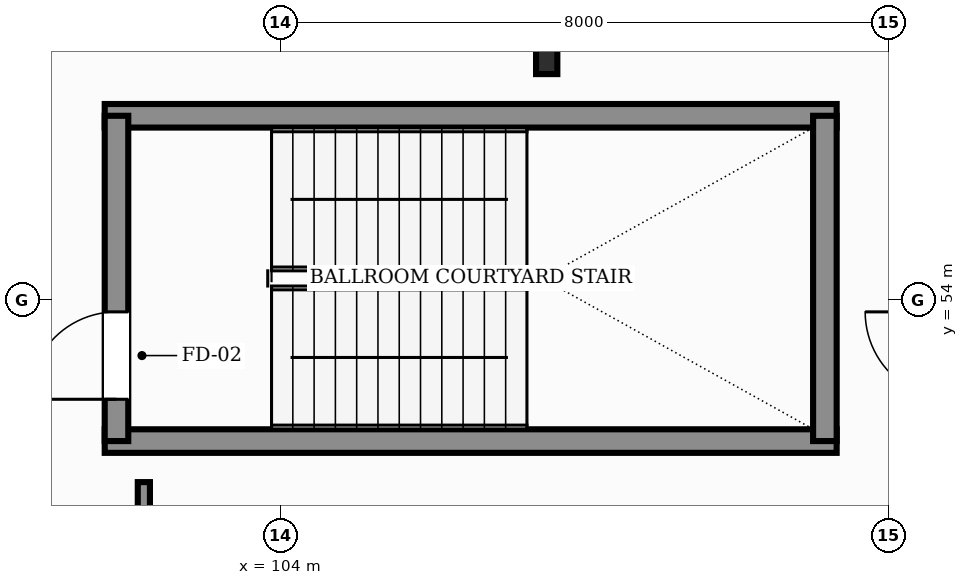
"""IFC4 building model, lengths in metres.
Left out: names, types, materials, properties, quantities, classifications, styles, units other than length and angle.
Written with IfcOpenShell. Run it as: python <this file> out.ifc"""

import sys

from ifc_helpers import new_model, si_unit, direction, frame, frame_2d, origin, origin_2d, place, context, subcontext, project, spatial, rectangle, i_section, extrude, element, fill, save


model = new_model("IFC4")
c1 = context("Model", 3, precision=1e-05, world=origin(), true_north=direction((0.0, 1.0)))
c2 = subcontext(c1, "Body", "Model", "MODEL_VIEW")
j1 = project(units=[si_unit("LENGTHUNIT", "METRE"), si_unit("PLANEANGLEUNIT", "RADIAN")], contexts=[c1])
p1 = place(None, origin())
s1 = spatial("IfcSite", under=j1, at=p1, CompositionType="ELEMENT")
p2 = place(p1, origin())
s2 = spatial("IfcBuilding", under=s1, at=p2, CompositionType="ELEMENT")
p3 = place(p2, frame((0.0, 0.0, 11.4)))
s3 = spatial("IfcBuildingStorey", under=s2, at=p3, CompositionType="ELEMENT", Elevation=11.4)
p4 = place(p3, frame((107.5, 57.2, 0.0), z_axis=(0.0, 0.0, 1.0), x_axis=(1.0, 0.0, 0.0)))
e1 = element("IfcColumn", 1, at=p4, inside=s3, PredefinedType="COLUMN", context=c2, shape_type="SweptSolid", body=[
    extrude(i_section(OverallWidth=0.28, OverallDepth=0.463, WebThickness=0.011, FlangeThickness=0.017, FilletRadius=0.012, at=origin_2d()), origin(), (0.0, 0.0, 1.0), 4.8),
])
for number, where, z_axis, x_axis in (
    (2, (101.685, 52.14, 0.0), (0.0, 0.0, 1.0), (1.0, 0.0, 0.0)),
    (3, (101.685, 56.42, 0.0), (0.0, 0.0, 1.0), (1.0, 0.0, 0.0)),
):
    element("IfcWall", number, at=place(p3, frame(where, z_axis=z_axis, x_axis=x_axis)), inside=s3, PredefinedType="SHEAR", context=c2, shape_type="SweptSolid", body=[
        extrude(rectangle(XDim=9.63, YDim=0.31, at=frame_2d((4.815, 0.0))), origin(), (0.0, 0.0, 1.0), 4.8),
    ])
p5 = place(p3, frame((101.84, 52.14, 0.0), z_axis=(0.0, 0.0, 1.0), x_axis=(0.0, 1.0, 0.0)))
e4 = element("IfcWall", 4, at=p5, inside=s3, PredefinedType="SHEAR", context=c2, shape_type="SweptSolid", body=[
    extrude(rectangle(XDim=4.28, YDim=0.31, at=frame_2d((2.14, 0.0))), origin(), (0.0, 0.0, 1.0), 4.8),
])
p6 = place(p5, frame((0.55, 0.0, 0.0)))
e5 = element("IfcOpeningElement", 5, at=p6, cuts=e4, PredefinedType="OPENING", context=c2, shape_type="SweptSolid", body=[
    extrude(rectangle(XDim=1.15, YDim=2.2, at=frame_2d((0.575, 1.1))), frame((0.0, 0.165, 0.0), z_axis=(0.0, -1.0, 0.0), x_axis=(1.0, 0.0, 0.0)), (0.0, 0.0, 1.0), 0.33),
])
p7 = place(p3, frame((111.16, 52.14, 0.0), z_axis=(0.0, 0.0, 1.0), x_axis=(0.0, 1.0, 0.0)))
e6 = element("IfcWall", 6, at=p7, inside=s3, PredefinedType="SHEAR", context=c2, shape_type="SweptSolid", body=[
    extrude(rectangle(XDim=4.28, YDim=0.31, at=frame_2d((2.14, 0.0))), origin(), (0.0, 0.0, 1.0), 4.8),
])
p8 = place(p3, frame((102.2, 27.4, 0.0), z_axis=(0.0, 0.0, 1.0), x_axis=(0.0, 1.0, 0.0)))
e7 = element("IfcWall", 7, at=p8, inside=s3, PredefinedType="PARTITIONING", context=c2, shape_type="SweptSolid", body=[
    extrude(rectangle(XDim=24.2, YDim=0.16, at=frame_2d((12.1, 0.0))), origin(), (0.0, 0.0, 1.0), 3.4),
])
p9 = place(p8, frame((6.5, 0.0, 0.0)))
e8 = element("IfcOpeningElement", 8, at=p9, cuts=e7, PredefinedType="OPENING", context=c2, shape_type="SweptSolid", body=[
    extrude(rectangle(XDim=2.2, YDim=2.6, at=frame_2d((1.1, 1.3))), frame((0.0, 0.09, 0.0), z_axis=(0.0, -1.0, 0.0), x_axis=(1.0, 0.0, 0.0)), (0.0, 0.0, 1.0), 0.18),
])
p10 = place(p8, frame((16.5, 0.0, 0.0)))
e9 = element("IfcOpeningElement", 9, at=p10, cuts=e7, PredefinedType="OPENING", context=c2, shape_type="SweptSolid", body=[
    extrude(rectangle(XDim=2.2, YDim=2.6, at=frame_2d((1.1, 1.3))), frame((0.0, 0.09, 0.0), z_axis=(0.0, -1.0, 0.0), x_axis=(1.0, 0.0, 0.0)), (0.0, 0.0, 1.0), 0.18),
])
p11 = place(p6, origin())
e10 = element("IfcDoor", 10, at=p11, inside=s3, OperationType="SINGLE_SWING_LEFT", PredefinedType="DOOR", context=c2, shape_type="SweptSolid", body=[
    extrude(rectangle(XDim=1.15, YDim=2.2, at=frame_2d((0.575, 1.1))), frame((0.0, 0.025, 0.0), z_axis=(0.0, -1.0, 0.0), x_axis=(1.0, 0.0, 0.0)), (0.0, 0.0, 1.0), 0.05),
])
fill(e5, e10)
save(model, sys.argv[1])
